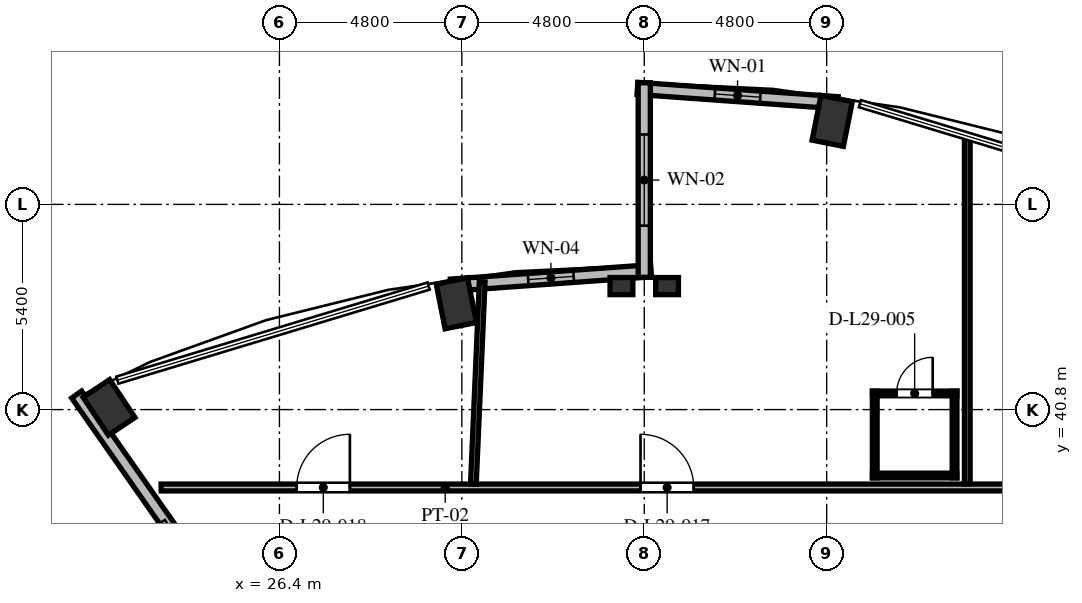
"""IFC4 building model, lengths in metres.
Left out: names, types, materials, properties, quantities, classifications, styles, units other than length and angle.
Written with IfcOpenShell. Run it as: python <this file> out.ifc"""

import sys

from ifc_helpers import new_model, si_unit, direction, frame, frame_2d, origin, origin_2d, place, context, subcontext, project, spatial, rectangle, extrude, element, fill, save


model = new_model("IFC4")
c1 = context("Model", 3, precision=1e-05, world=origin(), true_north=direction((0.0, 1.0)))
c2 = subcontext(c1, "Body", "Model", "MODEL_VIEW")
j1 = project(units=[si_unit("LENGTHUNIT", "METRE"), si_unit("PLANEANGLEUNIT", "RADIAN")], contexts=[c1])
p1 = place(None, origin())
s1 = spatial("IfcSite", under=j1, at=p1, CompositionType="ELEMENT")
p2 = place(p1, origin())
s2 = spatial("IfcBuilding", under=s1, at=p2, CompositionType="ELEMENT")
p3 = place(p2, frame((0.0, 0.0, 114.576)))
s3 = spatial("IfcBuildingStorey", under=s2, at=p3, CompositionType="ELEMENT", Elevation=114.576)
for number, where, z_axis, x_axis in (
    (1, (40.946, 48.397, 0.0), (0.0, 0.0, 1.0), (0.195, 0.981, 0.0)),
    (2, (31.054, 43.597, 0.0), (0.0, 0.0, 1.0), (-0.195, 0.981, 0.0)),
    (3, (21.916, 40.857, 0.0), (0.0, 0.0, 1.0), (-0.556, 0.831, 0.0)),
):
    element("IfcColumn", number, at=place(p3, frame(where, z_axis=z_axis, x_axis=x_axis)), inside=s3, PredefinedType="COLUMN", context=c2, shape_type="SweptSolid", body=[
        extrude(rectangle(XDim=1.2, YDim=0.84, at=origin_2d()), origin(), (0.0, 0.0, 1.0), 3.648),
    ])
for number, where, z_axis, x_axis in (
    (4, (35.4, 44.05, 0.0), (0.0, 0.0, 1.0), (1.0, 0.0, 0.0)),
    (5, (36.6, 44.05, 0.0), (0.0, 0.0, 1.0), (1.0, 0.0, 0.0)),
):
    element("IfcColumn", number, at=place(p3, frame(where, z_axis=z_axis, x_axis=x_axis)), inside=s3, PredefinedType="PILASTER", context=c2, shape_type="SweptSolid", body=[
        extrude(rectangle(XDim=0.6, YDim=0.45, at=origin_2d()), origin(), (0.0, 0.0, 1.0), 3.648),
    ])
p4 = place(p3, frame((41.091, 48.875, 0.0), z_axis=(0.0, 0.0, 1.0), x_axis=(-0.997432364291, 0.071614793619, 0.0)))
e6 = element("IfcWall", 6, at=p4, inside=s3, PredefinedType="SOLIDWALL", context=c2, shape_type="SweptSolid", body=[
    extrude(rectangle(XDim=5.284, YDim=0.32, at=frame_2d((2.642, 0.0))), origin(), (0.0, 0.0, 1.0), 3.428),
])
p5 = place(p4, frame((2.042, 0.0, 0.85)))
e7 = element("IfcOpeningElement", 7, at=p5, cuts=e6, PredefinedType="OPENING", context=c2, shape_type="SweptSolid", body=[
    extrude(rectangle(XDim=1.2, YDim=2.2, at=frame_2d((0.6, 1.1))), frame((0.0, 0.17, 0.0), z_axis=(0.0, -1.0, 0.0), x_axis=(1.0, 0.0, 0.0)), (0.0, 0.0, 1.0), 0.34),
])
p6 = place(p3, frame((36.179, 44.453, 0.0), z_axis=(0.0, 0.0, 1.0), x_axis=(-0.997431890304, -0.071621394884, 0.0)))
e8 = element("IfcWall", 8, at=p6, inside=s3, PredefinedType="SOLIDWALL", context=c2, shape_type="SweptSolid", body=[
    extrude(rectangle(XDim=5.284, YDim=0.32, at=frame_2d((2.642, 0.0))), origin(), (0.0, 0.0, 1.0), 3.428),
])
p7 = place(p6, frame((2.042, 0.0, 0.85)))
e9 = element("IfcOpeningElement", 9, at=p7, cuts=e8, PredefinedType="OPENING", context=c2, shape_type="SweptSolid", body=[
    extrude(rectangle(XDim=1.2, YDim=1.8, at=frame_2d((0.6, 0.9))), frame((0.0, 0.17, 0.0), z_axis=(0.0, -1.0, 0.0), x_axis=(1.0, 0.0, 0.0)), (0.0, 0.0, 1.0), 0.34),
])
p8 = place(p3, frame((36.0, 49.4, 0.0), z_axis=(0.0, 0.0, 1.0), x_axis=(0.0, -1.0, 0.0)))
e10 = element("IfcWall", 10, at=p8, inside=s3, PredefinedType="SOLIDWALL", context=c2, shape_type="SweptSolid", body=[
    extrude(rectangle(XDim=5.12, YDim=0.32, at=frame_2d((2.56, 0.0))), origin(), (0.0, 0.0, 1.0), 3.428),
])
p9 = place(p8, frame((1.36, 0.0, 0.84)))
e11 = element("IfcOpeningElement", 11, at=p9, cuts=e10, PredefinedType="OPENING", context=c2, shape_type="SweptSolid", body=[
    extrude(rectangle(XDim=2.4, YDim=2.04, at=frame_2d((1.2, 1.02))), frame((0.0, 0.17, 0.0), z_axis=(0.0, -1.0, 0.0), x_axis=(1.0, 0.0, 0.0)), (0.0, 0.0, 1.0), 0.34),
])
p10 = place(p3, frame((21.064, 41.197, 0.0), z_axis=(0.0, 0.0, 1.0), x_axis=(0.573586931721, -0.819144695252, 0.0)))
e12 = element("IfcWall", 12, at=p10, inside=s3, PredefinedType="SOLIDWALL", context=c2, shape_type="SweptSolid", body=[
    extrude(rectangle(XDim=4.34, YDim=0.32, at=frame_2d((2.17, 0.0))), origin(), (0.0, 0.0, 1.0), 3.428),
])
p11 = place(p3, frame((23.287, 38.75, 0.0), z_axis=(0.0, 0.0, 1.0), x_axis=(1.0, 0.0, 0.0)))
e13 = element("IfcWall", 13, at=p11, inside=s3, PredefinedType="PARTITIONING", context=c2, shape_type="SweptSolid", body=[
    extrude(rectangle(XDim=29.903, YDim=0.18, at=frame_2d((14.952, 0.0))), origin(), (0.0, 0.0, 1.0), 3.053),
])
p12 = place(p11, frame((12.615, 0.0, 0.0)))
e14 = element("IfcOpeningElement", 14, at=p12, cuts=e13, PredefinedType="OPENING", context=c2, shape_type="SweptSolid", body=[
    extrude(rectangle(XDim=1.4, YDim=2.2, at=frame_2d((0.7, 1.1))), frame((0.0, 0.1, 0.0), z_axis=(0.0, -1.0, 0.0), x_axis=(1.0, 0.0, 0.0)), (0.0, 0.0, 1.0), 0.2),
])
p13 = place(p11, frame((3.567, 0.0, 0.0)))
e15 = element("IfcOpeningElement", 15, at=p13, cuts=e13, PredefinedType="OPENING", context=c2, shape_type="SweptSolid", body=[
    extrude(rectangle(XDim=1.4, YDim=2.2, at=frame_2d((0.7, 1.1))), frame((0.0, 0.1, 0.0), z_axis=(0.0, -1.0, 0.0), x_axis=(1.0, 0.0, 0.0)), (0.0, 0.0, 1.0), 0.2),
])
p14 = place(p3, frame((31.503, 38.84, 0.0), z_axis=(0.0, 0.0, 1.0), x_axis=(0.043494903789, 0.999053648882, 0.0)))
e16 = element("IfcWall", 16, at=p14, inside=s3, PredefinedType="PARTITIONING", context=c2, shape_type="SweptSolid", body=[
    extrude(rectangle(XDim=5.327, YDim=0.15, at=frame_2d((2.664, 0.0))), origin(), (0.0, 0.0, 1.0), 2.813),
])
p15 = place(p3, frame((44.5, 38.84, 0.0), z_axis=(0.0, 0.0, 1.0), x_axis=(0.0, 1.0, 0.0)))
e17 = element("IfcWall", 17, at=p15, inside=s3, PredefinedType="PARTITIONING", context=c2, shape_type="SweptSolid", body=[
    extrude(rectangle(XDim=9.143, YDim=0.15, at=frame_2d((4.571, 0.0))), origin(), (0.0, 0.0, 1.0), 3.428),
])
p16 = place(p3, frame((42.005, 41.225, 0.0), z_axis=(0.0, 0.0, 1.0), x_axis=(1.0, 0.0, 0.0)))
e18 = element("IfcWall", 18, at=p16, inside=s3, PredefinedType="PARTITIONING", context=c2, shape_type="SweptSolid", body=[
    extrude(rectangle(XDim=2.22, YDim=0.125, at=frame_2d((1.11, 0.0))), origin(), (0.0, 0.0, 1.0), 3.428),
])
p17 = place(p16, frame((0.635, 0.0, 0.0)))
e19 = element("IfcOpeningElement", 19, at=p17, cuts=e18, PredefinedType="OPENING", context=c2, shape_type="SweptSolid", body=[
    extrude(rectangle(XDim=0.95, YDim=2.1, at=frame_2d((0.475, 1.05))), frame((0.0, 0.073, 0.0), z_axis=(0.0, -1.0, 0.0), x_axis=(1.0, 0.0, 0.0)), (0.0, 0.0, 1.0), 0.145),
])
p18 = place(p3, frame((42.005, 39.065, 0.0), z_axis=(0.0, 0.0, 1.0), x_axis=(1.0, 0.0, 0.0)))
e20 = element("IfcWall", 20, at=p18, inside=s3, PredefinedType="PARTITIONING", context=c2, shape_type="SweptSolid", body=[
    extrude(rectangle(XDim=2.22, YDim=0.125, at=frame_2d((1.11, 0.0))), origin(), (0.0, 0.0, 1.0), 3.428),
])
for number, where, z_axis, x_axis in (
    (21, (44.165, 39.005, 0.0), (0.0, 0.0, 1.0), (0.0, 1.0, 0.0)),
    (22, (42.065, 39.005, 0.0), (0.0, 0.0, 1.0), (0.0, 1.0, 0.0)),
):
    element("IfcWall", number, at=place(p3, frame(where, z_axis=z_axis, x_axis=x_axis)), inside=s3, PredefinedType="PARTITIONING", context=c2, shape_type="SweptSolid", body=[
        extrude(rectangle(XDim=2.28, YDim=0.125, at=frame_2d((1.14, 0.0))), origin(), (0.0, 0.0, 1.0), 3.428),
    ])
p19 = place(p5, origin())
e23 = element("IfcWindow", 23, at=p19, inside=s3, PartitioningType="SINGLE_PANEL", PredefinedType="WINDOW", context=c2, shape_type="SweptSolid", body=[
    extrude(rectangle(XDim=1.2, YDim=2.2, at=frame_2d((0.6, 1.1))), frame((0.0, 0.03, 0.0), z_axis=(0.0, -1.0, 0.0), x_axis=(1.0, 0.0, 0.0)), (0.0, 0.0, 1.0), 0.06),
])
fill(e7, e23)
p20 = place(p7, origin())
e24 = element("IfcWindow", 24, at=p20, inside=s3, PartitioningType="SINGLE_PANEL", PredefinedType="WINDOW", context=c2, shape_type="SweptSolid", body=[
    extrude(rectangle(XDim=1.2, YDim=1.8, at=frame_2d((0.6, 0.9))), frame((0.0, 0.03, 0.0), z_axis=(0.0, -1.0, 0.0), x_axis=(1.0, 0.0, 0.0)), (0.0, 0.0, 1.0), 0.06),
])
fill(e9, e24)
p21 = place(p9, origin())
e25 = element("IfcWindow", 25, at=p21, inside=s3, PartitioningType="SINGLE_PANEL", PredefinedType="WINDOW", context=c2, shape_type="SweptSolid", body=[
    extrude(rectangle(XDim=2.4, YDim=2.04, at=frame_2d((1.2, 1.02))), frame((0.0, 0.03, 0.0), z_axis=(0.0, -1.0, 0.0), x_axis=(1.0, 0.0, 0.0)), (0.0, 0.0, 1.0), 0.06),
])
fill(e11, e25)
p22 = place(p17, origin())
e26 = element("IfcDoor", 26, at=p22, inside=s3, OperationType="SINGLE_SWING_RIGHT", PredefinedType="DOOR", context=c2, shape_type="SweptSolid", body=[
    extrude(rectangle(XDim=0.95, YDim=2.1, at=frame_2d((0.475, 1.05))), frame((0.0, 0.025, 0.0), z_axis=(0.0, -1.0, 0.0), x_axis=(1.0, 0.0, 0.0)), (0.0, 0.0, 1.0), 0.05),
])
fill(e19, e26)
p23 = place(p12, origin())
e27 = element("IfcDoor", 27, at=p23, inside=s3, OperationType="SINGLE_SWING_LEFT", PredefinedType="DOOR", context=c2, shape_type="SweptSolid", body=[
    extrude(rectangle(XDim=1.4, YDim=2.2, at=frame_2d((0.7, 1.1))), frame((0.0, 0.025, 0.0), z_axis=(0.0, -1.0, 0.0), x_axis=(1.0, 0.0, 0.0)), (0.0, 0.0, 1.0), 0.05),
])
fill(e14, e27)
p24 = place(p13, origin())
e28 = element("IfcDoor", 28, at=p24, inside=s3, OperationType="SINGLE_SWING_RIGHT", PredefinedType="DOOR", context=c2, shape_type="SweptSolid", body=[
    extrude(rectangle(XDim=1.4, YDim=2.2, at=frame_2d((0.7, 1.1))), frame((0.0, 0.025, 0.0), z_axis=(0.0, -1.0, 0.0), x_axis=(1.0, 0.0, 0.0)), (0.0, 0.0, 1.0), 0.05),
])
fill(e15, e28)
save(model, sys.argv[1])
